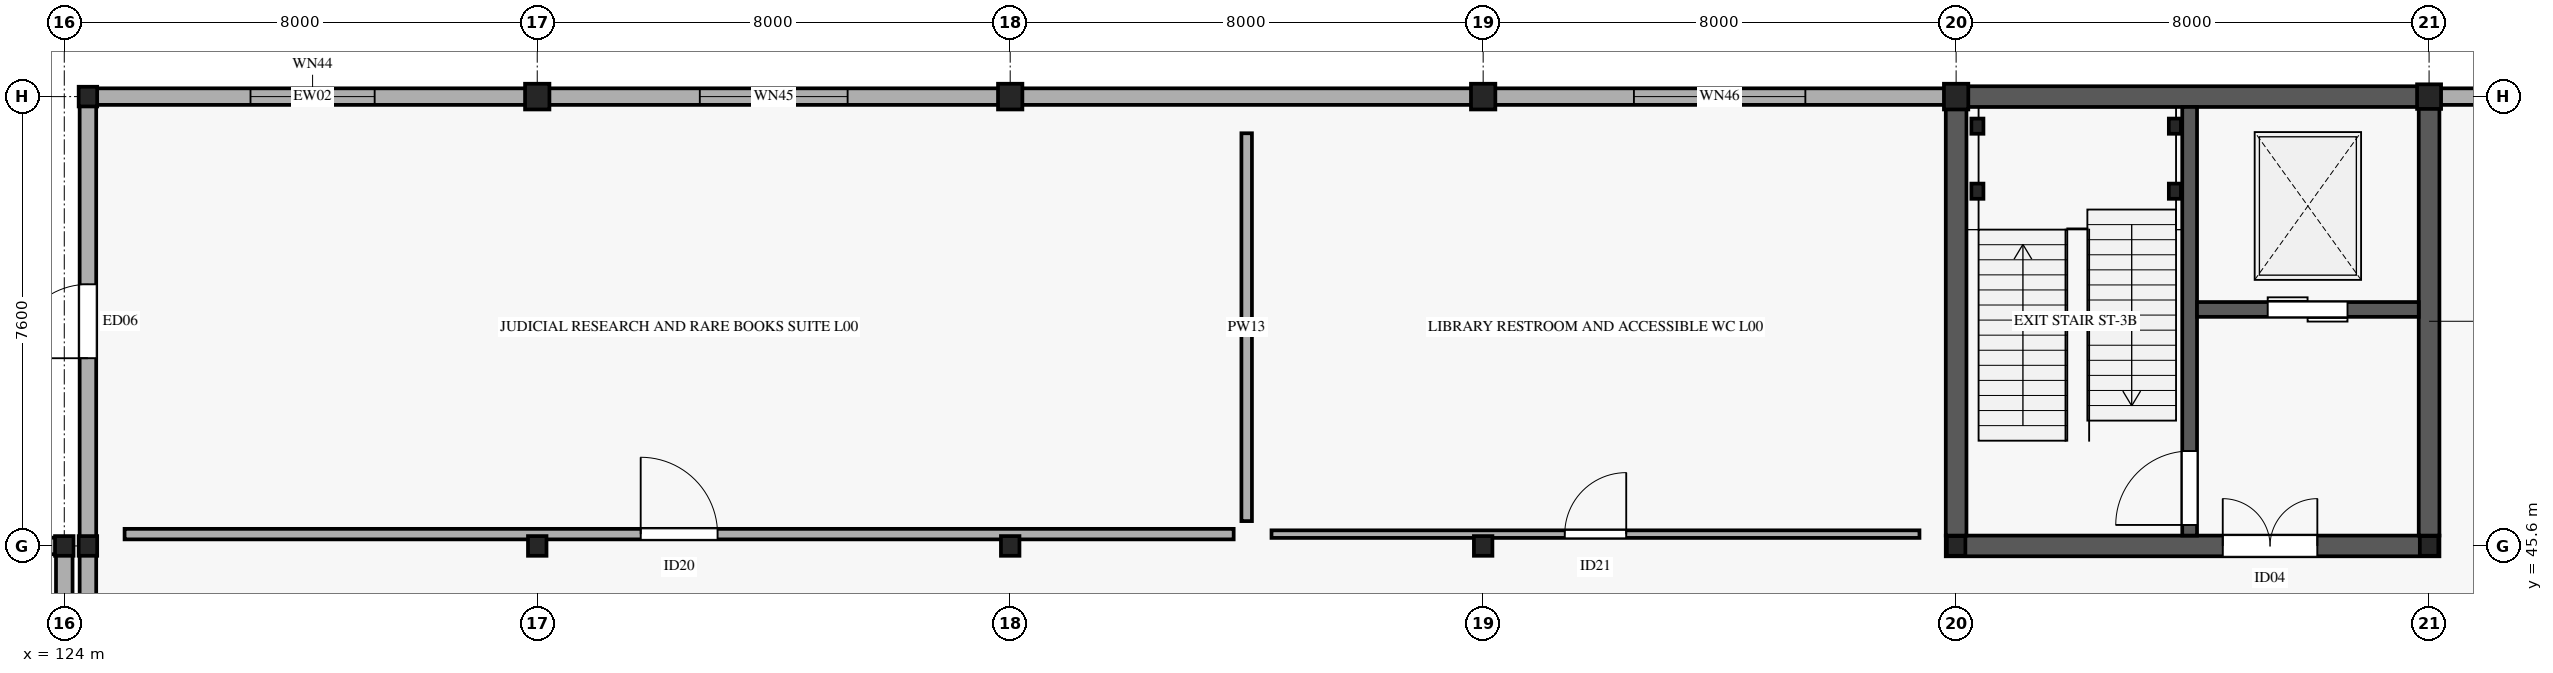
"""IFC4 building model, lengths in metres.
Left out: names, types, materials, properties, quantities, classifications, styles, units other than length and angle.
Written with IfcOpenShell. Run it as: python <this file> out.ifc"""

import sys

from ifc_helpers import new_model, si_unit, direction, frame, frame_2d, origin, origin_2d, place, context, subcontext, project, spatial, rectangle, i_section, extrude, element, fill, save


model = new_model("IFC4")
c1 = context("Model", 3, precision=1e-05, world=origin(), true_north=direction((0.0, 1.0)))
c2 = subcontext(c1, "Body", "Model", "MODEL_VIEW")
j1 = project(units=[si_unit("LENGTHUNIT", "METRE"), si_unit("PLANEANGLEUNIT", "RADIAN")], contexts=[c1])
p1 = place(None, origin())
s1 = spatial("IfcSite", under=j1, at=p1, CompositionType="ELEMENT")
p2 = place(p1, origin())
s2 = spatial("IfcBuilding", under=s1, at=p2, CompositionType="ELEMENT")
p3 = place(p2, origin())
s3 = spatial("IfcBuildingStorey", under=s2, at=p3, CompositionType="ELEMENT", Elevation=0.0)
for number, where, z_axis, x_axis in (
    (1, (124.4, 45.6, 0.0), (0.0, 0.0, 1.0), (1.0, 0.0, 0.0)),
    (2, (124.4, 53.2, 0.0), (0.0, 0.0, 1.0), (1.0, 0.0, 0.0)),
    (3, (132.0, 45.6, 0.0), (0.0, 0.0, 1.0), (1.0, 0.0, 0.0)),
):
    element("IfcColumn", number, at=place(p3, frame(where, z_axis=z_axis, x_axis=x_axis)), inside=s3, PredefinedType="COLUMN", context=c2, shape_type="SweptSolid", body=[
        extrude(i_section(OverallWidth=0.313, OverallDepth=0.333, WebThickness=0.018, FlangeThickness=0.028, FilletRadius=0.015, at=origin_2d()), origin(), (0.0, 0.0, 1.0), 5.185),
    ])
p4 = place(p3, frame((132.0, 53.2, 0.0), z_axis=(0.0, 0.0, 1.0), x_axis=(1.0, 0.0, 0.0)))
e4 = element("IfcColumn", 4, at=p4, inside=s3, PredefinedType="COLUMN", context=c2, shape_type="SweptSolid", body=[
    extrude(i_section(OverallWidth=0.412, OverallDepth=0.435, WebThickness=0.036, FlangeThickness=0.057, FilletRadius=0.015, at=origin_2d()), origin(), (0.0, 0.0, 1.0), 5.185),
])
p5 = place(p3, frame((140.0, 45.6, 0.0), z_axis=(0.0, 0.0, 1.0), x_axis=(1.0, 0.0, 0.0)))
e5 = element("IfcColumn", 5, at=p5, inside=s3, PredefinedType="COLUMN", context=c2, shape_type="SweptSolid", body=[
    extrude(i_section(OverallWidth=0.313, OverallDepth=0.333, WebThickness=0.018, FlangeThickness=0.028, FilletRadius=0.015, at=origin_2d()), origin(), (0.0, 0.0, 1.0), 5.185),
])
p6 = place(p3, frame((140.0, 53.2, 0.0), z_axis=(0.0, 0.0, 1.0), x_axis=(1.0, 0.0, 0.0)))
e6 = element("IfcColumn", 6, at=p6, inside=s3, PredefinedType="COLUMN", context=c2, shape_type="SweptSolid", body=[
    extrude(i_section(OverallWidth=0.412, OverallDepth=0.435, WebThickness=0.036, FlangeThickness=0.057, FilletRadius=0.015, at=origin_2d()), origin(), (0.0, 0.0, 1.0), 5.185),
])
p7 = place(p3, frame((148.0, 45.6, 0.0), z_axis=(0.0, 0.0, 1.0), x_axis=(1.0, 0.0, 0.0)))
e7 = element("IfcColumn", 7, at=p7, inside=s3, PredefinedType="COLUMN", context=c2, shape_type="SweptSolid", body=[
    extrude(i_section(OverallWidth=0.313, OverallDepth=0.333, WebThickness=0.018, FlangeThickness=0.028, FilletRadius=0.015, at=origin_2d()), origin(), (0.0, 0.0, 1.0), 5.185),
])
p8 = place(p3, frame((148.0, 53.2, 0.0), z_axis=(0.0, 0.0, 1.0), x_axis=(1.0, 0.0, 0.0)))
e8 = element("IfcColumn", 8, at=p8, inside=s3, PredefinedType="COLUMN", context=c2, shape_type="SweptSolid", body=[
    extrude(i_section(OverallWidth=0.412, OverallDepth=0.435, WebThickness=0.036, FlangeThickness=0.057, FilletRadius=0.015, at=origin_2d()), origin(), (0.0, 0.0, 1.0), 5.185),
])
p9 = place(p3, frame((156.0, 45.6, 0.0), z_axis=(0.0, 0.0, 1.0), x_axis=(1.0, 0.0, 0.0)))
e9 = element("IfcColumn", 9, at=p9, inside=s3, PredefinedType="COLUMN", context=c2, shape_type="SweptSolid", body=[
    extrude(i_section(OverallWidth=0.313, OverallDepth=0.333, WebThickness=0.018, FlangeThickness=0.028, FilletRadius=0.015, at=origin_2d()), origin(), (0.0, 0.0, 1.0), 5.185),
])
p10 = place(p3, frame((156.0, 53.2, 0.0), z_axis=(0.0, 0.0, 1.0), x_axis=(1.0, 0.0, 0.0)))
e10 = element("IfcColumn", 10, at=p10, inside=s3, PredefinedType="COLUMN", context=c2, shape_type="SweptSolid", body=[
    extrude(i_section(OverallWidth=0.412, OverallDepth=0.435, WebThickness=0.036, FlangeThickness=0.057, FilletRadius=0.015, at=origin_2d()), origin(), (0.0, 0.0, 1.0), 5.185),
])
p11 = place(p3, frame((164.0, 45.6, 0.0), z_axis=(0.0, 0.0, 1.0), x_axis=(1.0, 0.0, 0.0)))
e11 = element("IfcColumn", 11, at=p11, inside=s3, PredefinedType="COLUMN", context=c2, shape_type="SweptSolid", body=[
    extrude(i_section(OverallWidth=0.313, OverallDepth=0.333, WebThickness=0.018, FlangeThickness=0.028, FilletRadius=0.015, at=origin_2d()), origin(), (0.0, 0.0, 1.0), 5.185),
])
p12 = place(p3, frame((164.0, 53.2, 0.0), z_axis=(0.0, 0.0, 1.0), x_axis=(1.0, 0.0, 0.0)))
e12 = element("IfcColumn", 12, at=p12, inside=s3, PredefinedType="COLUMN", context=c2, shape_type="SweptSolid", body=[
    extrude(i_section(OverallWidth=0.406, OverallDepth=0.416, WebThickness=0.03, FlangeThickness=0.048, FilletRadius=0.015, at=origin_2d()), origin(), (0.0, 0.0, 1.0), 5.185),
])
p13 = place(p3, frame((124.0, 45.6, 0.0), z_axis=(0.0, 0.0, 1.0), x_axis=(1.0, 0.0, 0.0)))
e13 = element("IfcColumn", 13, at=p13, inside=s3, PredefinedType="COLUMN", context=c2, shape_type="SweptSolid", body=[
    extrude(i_section(OverallWidth=0.313, OverallDepth=0.333, WebThickness=0.018, FlangeThickness=0.028, FilletRadius=0.015, at=origin_2d()), origin(), (0.0, 0.0, 1.0), 5.185),
])
p14 = place(p3, frame((124.4, 37.98, 0.0), z_axis=(0.0, 0.0, 1.0), x_axis=(0.0, 1.0, 0.0)))
e14 = element("IfcWall", 14, at=p14, inside=s3, PredefinedType="STANDARD", context=c2, shape_type="SweptSolid", body=[
    extrude(rectangle(XDim=7.64, YDim=0.28, at=frame_2d((3.82, 0.0))), origin(), (0.0, 0.0, 1.0), 4.25),
])
p15 = place(p14, frame((2.97, 0.0, 0.0)))
e15 = element("IfcOpeningElement", 15, at=p15, cuts=e14, PredefinedType="OPENING", context=c2, shape_type="SweptSolid", body=[
    extrude(rectangle(XDim=1.7, YDim=2.35, at=frame_2d((0.85, 1.175))), frame((0.0, 0.15, 0.0), z_axis=(0.0, -1.0, 0.0), x_axis=(1.0, 0.0, 0.0)), (0.0, 0.0, 1.0), 0.3),
])
p16 = place(p3, frame((124.4, 45.58, 0.0), z_axis=(0.0, 0.0, 1.0), x_axis=(0.0, 1.0, 0.0)))
e16 = element("IfcWall", 16, at=p16, inside=s3, PredefinedType="STANDARD", context=c2, shape_type="SweptSolid", body=[
    extrude(rectangle(XDim=7.64, YDim=0.28, at=frame_2d((3.82, 0.0))), origin(), (0.0, 0.0, 1.0), 4.25),
])
p17 = place(p16, frame((3.195, 0.0, 0.0)))
e17 = element("IfcOpeningElement", 17, at=p17, cuts=e16, PredefinedType="OPENING", context=c2, shape_type="SweptSolid", body=[
    extrude(rectangle(XDim=1.25, YDim=2.3, at=frame_2d((0.625, 1.15))), frame((0.0, 0.15, 0.0), z_axis=(0.0, -1.0, 0.0), x_axis=(1.0, 0.0, 0.0)), (0.0, 0.0, 1.0), 0.3),
])
p18 = place(p3, frame((124.38, 53.2, 0.0), z_axis=(0.0, 0.0, 1.0), x_axis=(1.0, 0.0, 0.0)))
e18 = element("IfcWall", 18, at=p18, inside=s3, PredefinedType="STANDARD", context=c2, shape_type="SweptSolid", body=[
    extrude(rectangle(XDim=7.64, YDim=0.28, at=frame_2d((3.82, 0.0))), origin(), (0.0, 0.0, 1.0), 4.25),
])
p19 = place(p18, frame((2.77, 0.0, 0.75)))
e19 = element("IfcOpeningElement", 19, at=p19, cuts=e18, PredefinedType="OPENING", context=c2, shape_type="SweptSolid", body=[
    extrude(rectangle(XDim=2.1, YDim=1.65, at=frame_2d((1.05, 0.825))), frame((0.0, 0.15, 0.0), z_axis=(0.0, -1.0, 0.0), x_axis=(1.0, 0.0, 0.0)), (0.0, 0.0, 1.0), 0.3),
])
p20 = place(p3, frame((131.98, 53.2, 0.0), z_axis=(0.0, 0.0, 1.0), x_axis=(1.0, 0.0, 0.0)))
e20 = element("IfcWall", 20, at=p20, inside=s3, PredefinedType="STANDARD", context=c2, shape_type="SweptSolid", body=[
    extrude(rectangle(XDim=8.04, YDim=0.28, at=frame_2d((4.02, 0.0))), origin(), (0.0, 0.0, 1.0), 4.25),
])
p21 = place(p20, frame((2.77, 0.0, 0.75)))
e21 = element("IfcOpeningElement", 21, at=p21, cuts=e20, PredefinedType="OPENING", context=c2, shape_type="SweptSolid", body=[
    extrude(rectangle(XDim=2.5, YDim=1.65, at=frame_2d((1.25, 0.825))), frame((0.0, 0.15, 0.0), z_axis=(0.0, -1.0, 0.0), x_axis=(1.0, 0.0, 0.0)), (0.0, 0.0, 1.0), 0.3),
])
p22 = place(p3, frame((139.98, 53.2, 0.0), z_axis=(0.0, 0.0, 1.0), x_axis=(1.0, 0.0, 0.0)))
e22 = element("IfcWall", 22, at=p22, inside=s3, PredefinedType="STANDARD", context=c2, shape_type="SweptSolid", body=[
    extrude(rectangle(XDim=8.04, YDim=0.28, at=frame_2d((4.02, 0.0))), origin(), (0.0, 0.0, 1.0), 4.25),
])
p23 = place(p3, frame((147.98, 53.2, 0.0), z_axis=(0.0, 0.0, 1.0), x_axis=(1.0, 0.0, 0.0)))
e23 = element("IfcWall", 23, at=p23, inside=s3, PredefinedType="STANDARD", context=c2, shape_type="SweptSolid", body=[
    extrude(rectangle(XDim=8.04, YDim=0.28, at=frame_2d((4.02, 0.0))), origin(), (0.0, 0.0, 1.0), 4.25),
])
p24 = place(p23, frame((2.57, 0.0, 0.75)))
e24 = element("IfcOpeningElement", 24, at=p24, cuts=e23, PredefinedType="OPENING", context=c2, shape_type="SweptSolid", body=[
    extrude(rectangle(XDim=2.9, YDim=1.65, at=frame_2d((1.45, 0.825))), frame((0.0, 0.15, 0.0), z_axis=(0.0, -1.0, 0.0), x_axis=(1.0, 0.0, 0.0)), (0.0, 0.0, 1.0), 0.3),
])
p25 = place(p3, frame((163.98, 53.2, 0.0), z_axis=(0.0, 0.0, 1.0), x_axis=(1.0, 0.0, 0.0)))
e25 = element("IfcWall", 25, at=p25, inside=s3, PredefinedType="STANDARD", context=c2, shape_type="SweptSolid", body=[
    extrude(rectangle(XDim=8.04, YDim=0.28, at=frame_2d((4.02, 0.0))), origin(), (0.0, 0.0, 1.0), 4.25),
])
p26 = place(p25, frame((2.37, 0.0, 0.75)))
e26 = element("IfcOpeningElement", 26, at=p26, cuts=e25, PredefinedType="OPENING", context=c2, shape_type="SweptSolid", body=[
    extrude(rectangle(XDim=3.3, YDim=1.65, at=frame_2d((1.65, 0.825))), frame((0.0, 0.15, 0.0), z_axis=(0.0, -1.0, 0.0), x_axis=(1.0, 0.0, 0.0)), (0.0, 0.0, 1.0), 0.3),
])
p27 = place(p3, frame((115.98, 45.6, 0.0), z_axis=(0.0, 0.0, 1.0), x_axis=(1.0, 0.0, 0.0)))
e27 = element("IfcWall", 27, at=p27, inside=s3, PredefinedType="STANDARD", context=c2, shape_type="SweptSolid", body=[
    extrude(rectangle(XDim=8.04, YDim=0.28, at=frame_2d((4.02, 0.0))), origin(), (0.0, 0.0, 1.0), 4.25),
])
p28 = place(p27, frame((2.92, 0.0, 0.75)))
e28 = element("IfcOpeningElement", 28, at=p28, cuts=e27, PredefinedType="OPENING", context=c2, shape_type="SweptSolid", body=[
    extrude(rectangle(XDim=2.2, YDim=2.0, at=frame_2d((1.1, 1.0))), frame((0.0, 0.15, 0.0), z_axis=(0.0, -1.0, 0.0), x_axis=(1.0, 0.0, 0.0)), (0.0, 0.0, 1.0), 0.3),
])
p29 = place(p3, frame((124.0, 45.62, 0.0), z_axis=(0.0, 0.0, 1.0), x_axis=(0.0, -1.0, 0.0)))
e29 = element("IfcWall", 29, at=p29, inside=s3, PredefinedType="STANDARD", context=c2, shape_type="SweptSolid", body=[
    extrude(rectangle(XDim=7.64, YDim=0.28, at=frame_2d((3.82, 0.0))), origin(), (0.0, 0.0, 1.0), 4.25),
])
p30 = place(p29, frame((2.62, 0.0, 0.75)))
e30 = element("IfcOpeningElement", 30, at=p30, cuts=e29, PredefinedType="OPENING", context=c2, shape_type="SweptSolid", body=[
    extrude(rectangle(XDim=2.4, YDim=2.0, at=frame_2d((1.2, 1.0))), frame((0.0, 0.15, 0.0), z_axis=(0.0, -1.0, 0.0), x_axis=(1.0, 0.0, 0.0)), (0.0, 0.0, 1.0), 0.3),
])
p31 = place(p3, frame((155.825, 45.6, 0.0), z_axis=(0.0, 0.0, 1.0), x_axis=(1.0, 0.0, 0.0)))
e31 = element("IfcWall", 31, at=p31, inside=s3, PredefinedType="SHEAR", context=c2, shape_type="SweptSolid", body=[
    extrude(rectangle(XDim=8.35, YDim=0.35, at=frame_2d((4.175, 0.0))), origin(), (0.0, 0.0, 1.0), 5.19),
])
p32 = place(p31, frame((4.685, 0.0, 0.0)))
e32 = element("IfcOpeningElement", 32, at=p32, cuts=e31, PredefinedType="OPENING", context=c2, shape_type="SweptSolid", body=[
    extrude(rectangle(XDim=1.6, YDim=2.35, at=frame_2d((0.8, 1.175))), frame((0.0, 0.185, 0.0), z_axis=(0.0, -1.0, 0.0), x_axis=(1.0, 0.0, 0.0)), (0.0, 0.0, 1.0), 0.37),
])
p33 = place(p3, frame((155.825, 53.2, 0.0), z_axis=(0.0, 0.0, 1.0), x_axis=(1.0, 0.0, 0.0)))
e33 = element("IfcWall", 33, at=p33, inside=s3, PredefinedType="SHEAR", context=c2, shape_type="SweptSolid", body=[
    extrude(rectangle(XDim=8.35, YDim=0.35, at=frame_2d((4.175, 0.0))), origin(), (0.0, 0.0, 1.0), 5.19),
])
for number, where, z_axis, x_axis in (
    (34, (156.0, 45.775, 0.0), (0.0, 0.0, 1.0), (0.0, 1.0, 0.0)),
    (35, (164.0, 45.775, 0.0), (0.0, 0.0, 1.0), (0.0, 1.0, 0.0)),
):
    element("IfcWall", number, at=place(p3, frame(where, z_axis=z_axis, x_axis=x_axis)), inside=s3, PredefinedType="SHEAR", context=c2, shape_type="SweptSolid", body=[
        extrude(rectangle(XDim=7.25, YDim=0.35, at=frame_2d((3.625, 0.0))), origin(), (0.0, 0.0, 1.0), 5.19),
    ])
p34 = place(p3, frame((159.95, 45.775, 0.0), z_axis=(0.0, 0.0, 1.0), x_axis=(0.0, 1.0, 0.0)))
e36 = element("IfcWall", 36, at=p34, inside=s3, PredefinedType="SHEAR", context=c2, shape_type="SweptSolid", body=[
    extrude(rectangle(XDim=7.25, YDim=0.25, at=frame_2d((3.625, 0.0))), origin(), (0.0, 0.0, 1.0), 5.19),
])
p35 = place(p34, frame((0.18, 0.0, 0.0)))
e37 = element("IfcOpeningElement", 37, at=p35, cuts=e36, PredefinedType="OPENING", context=c2, shape_type="SweptSolid", body=[
    extrude(rectangle(XDim=1.25, YDim=2.2, at=frame_2d((0.625, 1.1))), frame((0.0, 0.135, 0.0), z_axis=(0.0, -1.0, 0.0), x_axis=(1.0, 0.0, 0.0)), (0.0, 0.0, 1.0), 0.27),
])
p36 = place(p3, frame((160.075, 49.6, 0.0), z_axis=(0.0, 0.0, 1.0), x_axis=(1.0, 0.0, 0.0)))
e38 = element("IfcWall", 38, at=p36, inside=s3, PredefinedType="SHEAR", context=c2, shape_type="SweptSolid", body=[
    extrude(rectangle(XDim=3.75, YDim=0.25, at=frame_2d((1.875, 0.0))), origin(), (0.0, 0.0, 1.0), 5.19),
])
p37 = place(p36, frame((1.195, 0.0, 0.0)))
e39 = element("IfcOpeningElement", 39, at=p37, cuts=e38, PredefinedType="OPENING", context=c2, shape_type="SweptSolid", body=[
    extrude(rectangle(XDim=1.35, YDim=2.2, at=frame_2d((0.675, 1.1))), frame((0.0, 0.135, 0.0), z_axis=(0.0, -1.0, 0.0), x_axis=(1.0, 0.0, 0.0)), (0.0, 0.0, 1.0), 0.27),
])
for number, where, z_axis, x_axis in (
    (40, (156.36, 51.6, -0.23), (0.0, 0.0, 1.0), (1.0, 0.0, 0.0)),
    (41, (159.7, 51.6, -0.23), (0.0, 0.0, 1.0), (1.0, 0.0, 0.0)),
    (42, (156.36, 52.7, -0.23), (0.0, 0.0, 1.0), (1.0, 0.0, 0.0)),
    (43, (159.7, 52.7, -0.23), (0.0, 0.0, 1.0), (1.0, 0.0, 0.0)),
):
    element("IfcColumn", number, at=place(p3, frame(where, z_axis=z_axis, x_axis=x_axis)), inside=s3, PredefinedType="COLUMN", context=c2, shape_type="SweptSolid", body=[
        extrude(i_section(OverallWidth=0.204, OverallDepth=0.257, WebThickness=0.009, FlangeThickness=0.016, FilletRadius=0.013, at=origin_2d()), origin(), (0.0, 0.0, 1.0), 5.625),
    ])
p38 = place(p3, frame((125.02, 45.8, 0.0), z_axis=(0.0, 0.0, 1.0), x_axis=(1.0, 0.0, 0.0)))
e44 = element("IfcWall", 44, at=p38, inside=s3, PredefinedType="PARTITIONING", context=c2, shape_type="SweptSolid", body=[
    extrude(rectangle(XDim=18.76, YDim=0.178, at=frame_2d((9.38, 0.0))), origin(), (0.0, 0.0, 1.0), 4.05),
])
p39 = place(p38, frame((8.73, 0.0, 0.0)))
e45 = element("IfcOpeningElement", 45, at=p39, cuts=e44, PredefinedType="OPENING", context=c2, shape_type="SweptSolid", body=[
    extrude(rectangle(XDim=1.3, YDim=2.2, at=frame_2d((0.65, 1.1))), frame((0.0, 0.099, 0.0), z_axis=(0.0, -1.0, 0.0), x_axis=(1.0, 0.0, 0.0)), (0.0, 0.0, 1.0), 0.198),
])
p40 = place(p3, frame((144.0, 46.02, 0.0), z_axis=(0.0, 0.0, 1.0), x_axis=(0.0, 1.0, 0.0)))
e46 = element("IfcWall", 46, at=p40, inside=s3, PredefinedType="PARTITIONING", context=c2, shape_type="SweptSolid", body=[
    extrude(rectangle(XDim=6.56, YDim=0.178, at=frame_2d((3.28, 0.0))), origin(), (0.0, 0.0, 1.0), 4.05),
])
p41 = place(p3, frame((144.42, 45.8, 0.0), z_axis=(0.0, 0.0, 1.0), x_axis=(1.0, 0.0, 0.0)))
e47 = element("IfcWall", 47, at=p41, inside=s3, PredefinedType="PARTITIONING", context=c2, shape_type="SweptSolid", body=[
    extrude(rectangle(XDim=10.96, YDim=0.128, at=frame_2d((5.48, 0.0))), origin(), (0.0, 0.0, 1.0), 4.05),
])
p42 = place(p41, frame((4.96, 0.0, 0.0)))
e48 = element("IfcOpeningElement", 48, at=p42, cuts=e47, PredefinedType="OPENING", context=c2, shape_type="SweptSolid", body=[
    extrude(rectangle(XDim=1.04, YDim=2.2, at=frame_2d((0.52, 1.1))), frame((0.0, 0.074, 0.0), z_axis=(0.0, -1.0, 0.0), x_axis=(1.0, 0.0, 0.0)), (0.0, 0.0, 1.0), 0.148),
])
p43 = place(p17, origin())
e49 = element("IfcDoor", 49, at=p43, inside=s3, OperationType="SINGLE_SWING_LEFT", PredefinedType="DOOR", context=c2, shape_type="SweptSolid", body=[
    extrude(rectangle(XDim=1.25, YDim=2.3, at=frame_2d((0.625, 1.15))), frame((0.0, 0.025, 0.0), z_axis=(0.0, -1.0, 0.0), x_axis=(1.0, 0.0, 0.0)), (0.0, 0.0, 1.0), 0.05),
])
fill(e17, e49)
p44 = place(p19, origin())
e50 = element("IfcWindow", 50, at=p44, inside=s3, PartitioningType="SINGLE_PANEL", PredefinedType="WINDOW", context=c2, shape_type="SweptSolid", body=[
    extrude(rectangle(XDim=2.1, YDim=1.65, at=frame_2d((1.05, 0.825))), frame((0.0, 0.03, 0.0), z_axis=(0.0, -1.0, 0.0), x_axis=(1.0, 0.0, 0.0)), (0.0, 0.0, 1.0), 0.06),
])
fill(e19, e50)
p45 = place(p21, origin())
e51 = element("IfcWindow", 51, at=p45, inside=s3, PartitioningType="SINGLE_PANEL", PredefinedType="WINDOW", context=c2, shape_type="SweptSolid", body=[
    extrude(rectangle(XDim=2.5, YDim=1.65, at=frame_2d((1.25, 0.825))), frame((0.0, 0.03, 0.0), z_axis=(0.0, -1.0, 0.0), x_axis=(1.0, 0.0, 0.0)), (0.0, 0.0, 1.0), 0.06),
])
fill(e21, e51)
p46 = place(p24, origin())
e52 = element("IfcWindow", 52, at=p46, inside=s3, PartitioningType="SINGLE_PANEL", PredefinedType="WINDOW", context=c2, shape_type="SweptSolid", body=[
    extrude(rectangle(XDim=2.9, YDim=1.65, at=frame_2d((1.45, 0.825))), frame((0.0, 0.03, 0.0), z_axis=(0.0, -1.0, 0.0), x_axis=(1.0, 0.0, 0.0)), (0.0, 0.0, 1.0), 0.06),
])
fill(e24, e52)
p47 = place(p35, origin())
e53 = element("IfcDoor", 53, at=p47, inside=s3, OperationType="SINGLE_SWING_LEFT", PredefinedType="DOOR", context=c2, shape_type="SweptSolid", body=[
    extrude(rectangle(XDim=1.25, YDim=2.2, at=frame_2d((0.625, 1.1))), frame((0.0, 0.025, 0.0), z_axis=(0.0, -1.0, 0.0), x_axis=(1.0, 0.0, 0.0)), (0.0, 0.0, 1.0), 0.05),
])
fill(e37, e53)
p48 = place(p32, origin())
e54 = element("IfcDoor", 54, at=p48, inside=s3, OperationType="DOUBLE_DOOR_SINGLE_SWING", PredefinedType="DOOR", context=c2, shape_type="SweptSolid", body=[
    extrude(rectangle(XDim=1.6, YDim=2.35, at=frame_2d((0.8, 1.175))), frame((0.0, 0.025, 0.0), z_axis=(0.0, -1.0, 0.0), x_axis=(1.0, 0.0, 0.0)), (0.0, 0.0, 1.0), 0.05),
])
fill(e32, e54)
p49 = place(p37, origin())
e55 = element("IfcDoor", 55, at=p49, inside=s3, OperationType="DOUBLE_DOOR_SLIDING", PredefinedType="DOOR", context=c2, shape_type="SweptSolid", body=[
    extrude(rectangle(XDim=1.35, YDim=2.2, at=frame_2d((0.675, 1.1))), frame((0.0, 0.025, 0.0), z_axis=(0.0, -1.0, 0.0), x_axis=(1.0, 0.0, 0.0)), (0.0, 0.0, 1.0), 0.05),
])
fill(e39, e55)
p50 = place(p39, origin())
e56 = element("IfcDoor", 56, at=p50, inside=s3, OperationType="SINGLE_SWING_LEFT", PredefinedType="DOOR", context=c2, shape_type="SweptSolid", body=[
    extrude(rectangle(XDim=1.3, YDim=2.2, at=frame_2d((0.65, 1.1))), frame((0.0, 0.025, 0.0), z_axis=(0.0, -1.0, 0.0), x_axis=(1.0, 0.0, 0.0)), (0.0, 0.0, 1.0), 0.05),
])
fill(e45, e56)
p51 = place(p42, origin())
e57 = element("IfcDoor", 57, at=p51, inside=s3, OperationType="SINGLE_SWING_RIGHT", PredefinedType="DOOR", context=c2, shape_type="SweptSolid", body=[
    extrude(rectangle(XDim=1.04, YDim=2.2, at=frame_2d((0.52, 1.1))), frame((0.0, 0.025, 0.0), z_axis=(0.0, -1.0, 0.0), x_axis=(1.0, 0.0, 0.0)), (0.0, 0.0, 1.0), 0.05),
])
fill(e48, e57)
save(model, sys.argv[1])
